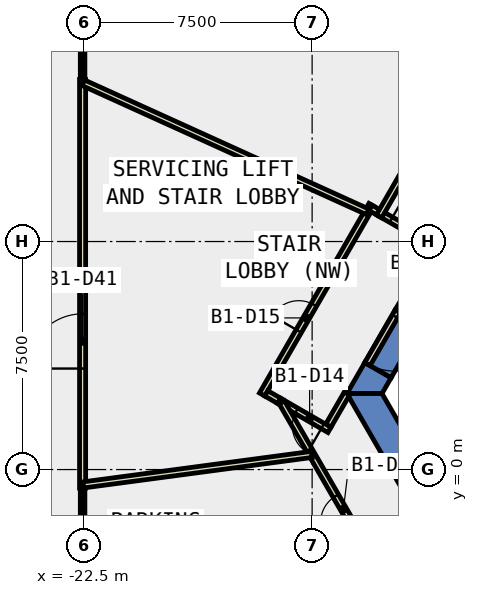
"""IFC4 building model, lengths in metres.
Left out: names, types, materials, properties, quantities, classifications, styles, units other than length and angle.
Written with IfcOpenShell. Run it as: python <this file> out.ifc"""

import sys

from ifc_helpers import new_model, si_unit, direction, frame, frame_2d, origin, place, context, subcontext, project, spatial, polyline, rectangle, outline, extrude, element, fill, save


model = new_model("IFC4")
c1 = context("Model", 3, precision=1e-05, world=origin(), true_north=direction((0.0, 1.0)))
c2 = subcontext(c1, "Body", "Model", "MODEL_VIEW")
j1 = project(units=[si_unit("LENGTHUNIT", "METRE"), si_unit("PLANEANGLEUNIT", "RADIAN")], contexts=[c1])
p1 = place(None, origin())
s1 = spatial("IfcSite", under=j1, at=p1, CompositionType="ELEMENT")
p2 = place(p1, origin())
s2 = spatial("IfcBuilding", under=s1, at=p2, CompositionType="ELEMENT")
p3 = place(p2, frame((0.0, 0.0, -5.5)))
s3 = spatial("IfcBuildingStorey", under=s2, at=p3, CompositionType="ELEMENT", Elevation=-5.5)
p4 = place(p3, frame((0.0, 0.0, -0.42)))
e1 = element("IfcWall", 1, at=p4, inside=s3, PredefinedType="SHEAR", context=c2, shape_type="SweptSolid", body=[
    extrude(outline(polyline([(-12.267, 5.252), (-11.402, 4.752), (-6.351, 13.5), (-6.928, 14.5), (-12.267, 5.252)])), origin(), (0.0, 0.0, 1.0), 5.42),
])
p5 = place(p3, frame((0.0, 0.0, -0.42)))
e2 = element("IfcWall", 2, at=p5, inside=s3, PredefinedType="SHEAR", context=c2, shape_type="SweptSolid", body=[
    extrude(outline(polyline([(-12.402, 3.02), (-13.267, 3.52), (-13.856, 2.5), (-12.702, 2.5), (-12.402, 3.02)])), origin(), (0.0, 0.0, 1.0), 5.42),
])
p6 = place(p3, frame((0.0, 0.0, 3.6)))
e3 = element("IfcWall", 3, at=p6, inside=s3, PredefinedType="SHEAR", context=c2, shape_type="SweptSolid", body=[
    extrude(outline(polyline([(-13.267, 3.52), (-12.402, 3.02), (-11.402, 4.752), (-12.267, 5.252), (-13.267, 3.52)])), origin(), (0.0, 0.0, 1.0), 1.4),
])
p7 = place(p3, frame((0.0, 0.0, -0.42)))
e4 = element("IfcWall", 4, at=p7, inside=s3, PredefinedType="SHEAR", context=c2, shape_type="SweptSolid", body=[
    extrude(outline(polyline([(-13.856, 2.5), (-6.928, -9.5), (-6.351, -8.5), (-12.702, 2.5), (-13.856, 2.5)])), origin(), (0.0, 0.0, 1.0), 5.42),
])
p8 = place(p3, frame((-22.55, -0.608, 0.0), z_axis=(0.0, 0.0, 1.0), x_axis=(0.0, 1.0, 0.0)))
e5 = element("IfcWall", 5, at=p8, inside=s3, PredefinedType="PARTITIONING", context=c2, shape_type="SweptSolid", body=[
    extrude(rectangle(XDim=13.439, YDim=0.2, at=frame_2d((6.719, 0.0))), origin(), (0.0, 0.0, 1.0), 4.9),
])
p9 = place(p8, frame((3.93, 0.0, 0.0)))
e6 = element("IfcOpeningElement", 6, at=p9, cuts=e5, PredefinedType="OPENING", context=c2, shape_type="SweptSolid", body=[
    extrude(rectangle(XDim=1.8, YDim=2.1, at=frame_2d((0.9, 1.05))), frame((0.0, 0.11, 0.0), z_axis=(0.0, -1.0, 0.0), x_axis=(1.0, 0.0, 0.0)), (0.0, 0.0, 1.0), 0.22),
])
p10 = place(p3, frame((-22.55, 12.831, 0.0), z_axis=(0.0, 0.0, 1.0), x_axis=(0.0, 1.0, 0.0)))
e7 = element("IfcWall", 7, at=p10, inside=s3, PredefinedType="PARTITIONING", context=c2, shape_type="SweptSolid", body=[
    extrude(rectangle(XDim=9.644, YDim=0.15, at=frame_2d((4.822, 0.0))), origin(), (0.0, 0.0, 1.0), 4.9),
])
p11 = place(p3, frame((-22.55, -5.126, 0.0), z_axis=(0.0, 0.0, 1.0), x_axis=(0.0, 1.0, 0.0)))
e8 = element("IfcWall", 8, at=p11, inside=s3, PredefinedType="PARTITIONING", context=c2, shape_type="SweptSolid", body=[
    extrude(rectangle(XDim=4.518, YDim=0.15, at=frame_2d((2.259, 0.0))), origin(), (0.0, 0.0, 1.0), 4.9),
])
p12 = place(p3, frame((-12.749, 8.417, 0.0), z_axis=(0.0, 0.0, 1.0), x_axis=(0.866010750942, -0.50002537861, 0.0)))
e9 = element("IfcWall", 9, at=p12, inside=s3, PredefinedType="PARTITIONING", context=c2, shape_type="SweptSolid", body=[
    extrude(rectangle(XDim=2.0, YDim=0.2, at=frame_2d((1.0, 0.0))), origin(), (0.0, 0.0, 1.0), 4.9),
])
p13 = place(p12, frame((0.4, 0.0, 0.0)))
e10 = element("IfcOpeningElement", 10, at=p13, cuts=e9, PredefinedType="OPENING", context=c2, shape_type="SweptSolid", body=[
    extrude(rectangle(XDim=1.0, YDim=2.1, at=frame_2d((0.5, 1.05))), frame((0.0, 0.11, 0.0), z_axis=(0.0, -1.0, 0.0), x_axis=(1.0, 0.0, 0.0)), (0.0, 0.0, 1.0), 0.22),
])
p14 = place(p3, frame((-13.856, 2.5, 0.0), z_axis=(0.0, 0.0, 1.0), x_axis=(-0.500114474492, -0.865959301817, 0.0)))
e11 = element("IfcWall", 11, at=p14, inside=s3, PredefinedType="PARTITIONING", context=c2, shape_type="SweptSolid", body=[
    extrude(rectangle(XDim=1.222, YDim=0.2, at=frame_2d((0.611, 0.0))), origin(), (0.0, 0.0, 1.0), 4.9),
])
p15 = place(p3, frame((-14.43, 1.305, 0.0), z_axis=(0.0, 0.0, 1.0), x_axis=(-0.866000389056, 0.500043324278, 0.0)))
e12 = element("IfcWall", 12, at=p15, inside=s3, PredefinedType="PARTITIONING", context=c2, shape_type="SweptSolid", body=[
    extrude(rectangle(XDim=1.91, YDim=0.2, at=frame_2d((0.955, 0.0))), origin(), (0.0, 0.0, 1.0), 4.9),
])
p16 = place(p15, frame((0.254, 0.0, 0.0)))
e13 = element("IfcOpeningElement", 13, at=p16, cuts=e12, PredefinedType="OPENING", context=c2, shape_type="SweptSolid", body=[
    extrude(rectangle(XDim=1.0, YDim=2.1, at=frame_2d((0.5, 1.05))), frame((0.0, 0.11, 0.0), z_axis=(0.0, -1.0, 0.0), x_axis=(1.0, 0.0, 0.0)), (0.0, 0.0, 1.0), 0.22),
])
p17 = place(p3, frame((-16.645, 2.468, 0.0), z_axis=(0.0, 0.0, 1.0), x_axis=(0.499968011863, 0.866043871356, 0.0)))
e14 = element("IfcWall", 14, at=p17, inside=s3, PredefinedType="PARTITIONING", context=c2, shape_type="SweptSolid", body=[
    extrude(rectangle(XDim=7.201, YDim=0.2, at=frame_2d((3.6, 0.0))), origin(), (0.0, 0.0, 1.0), 4.9),
])
p18 = place(p17, frame((2.409, 0.0, 0.0)))
e15 = element("IfcOpeningElement", 15, at=p18, cuts=e14, PredefinedType="OPENING", context=c2, shape_type="SweptSolid", body=[
    extrude(rectangle(XDim=1.0, YDim=2.1, at=frame_2d((0.5, 1.05))), frame((0.0, 0.11, 0.0), z_axis=(0.0, -1.0, 0.0), x_axis=(1.0, 0.0, 0.0)), (0.0, 0.0, 1.0), 0.22),
])
p19 = place(p3, frame((-16.508, 2.505, 0.0), z_axis=(0.0, 0.0, 1.0), x_axis=(0.865494662716, -0.500918145819, 0.0)))
e16 = element("IfcWall", 16, at=p19, inside=s3, PredefinedType="PARTITIONING", context=c2, shape_type="SweptSolid", body=[
    extrude(rectangle(XDim=0.489, YDim=0.2, at=frame_2d((0.244, 0.0))), origin(), (0.0, 0.0, 1.0), 4.9),
])
p20 = place(p3, frame((-13.082, 8.609, 0.0), z_axis=(0.0, 0.0, 1.0), x_axis=(0.865998573537, -0.500046468473, 0.0)))
e17 = element("IfcWall", 17, at=p20, inside=s3, PredefinedType="PARTITIONING", context=c2, shape_type="SweptSolid", body=[
    extrude(rectangle(XDim=0.37, YDim=0.2, at=frame_2d((0.185, 0.0))), origin(), (0.0, 0.0, 1.0), 4.9),
])
p21 = place(p3, frame((-12.799, 8.33, 0.0), z_axis=(0.0, 0.0, 1.0), x_axis=(0.499923440311, 0.86606960103, 0.0)))
e18 = element("IfcWall", 18, at=p21, inside=s3, PredefinedType="PARTITIONING", context=c2, shape_type="SweptSolid", body=[
    extrude(rectangle(XDim=9.534, YDim=0.2, at=frame_2d((4.767, 0.0))), origin(), (0.0, 0.0, 1.0), 4.9),
])
p22 = place(p21, frame((5.986, 0.0, 0.0)))
e19 = element("IfcOpeningElement", 19, at=p22, cuts=e18, PredefinedType="OPENING", context=c2, shape_type="SweptSolid", body=[
    extrude(rectangle(XDim=1.0, YDim=2.1, at=frame_2d((0.5, 1.05))), frame((0.0, 0.11, 0.0), z_axis=(0.0, -1.0, 0.0), x_axis=(1.0, 0.0, 0.0)), (0.0, 0.0, 1.0), 0.22),
])
p23 = place(p3, frame((-13.485, -2.142, 0.0), z_axis=(0.0, 0.0, 1.0), x_axis=(-0.500042049778, 0.866001124973, 0.0)))
e20 = element("IfcWall", 20, at=p23, inside=s3, PredefinedType="PARTITIONING", context=c2, shape_type="SweptSolid", body=[
    extrude(rectangle(XDim=5.025, YDim=0.2, at=frame_2d((2.513, 0.0))), origin(), (0.0, 0.0, 1.0), 4.9),
])
p24 = place(p23, frame((0.47, 0.0, 0.0)))
e21 = element("IfcOpeningElement", 21, at=p24, cuts=e20, PredefinedType="OPENING", context=c2, shape_type="SweptSolid", body=[
    extrude(rectangle(XDim=1.0, YDim=2.1, at=frame_2d((0.5, 1.05))), frame((0.0, 0.11, 0.0), z_axis=(0.0, -1.0, 0.0), x_axis=(1.0, 0.0, 0.0)), (0.0, 0.0, 1.0), 0.22),
])
p25 = place(p3, frame((-22.527, 12.721, 0.0), z_axis=(0.0, 0.0, 1.0), x_axis=(0.910643923171, -0.413192019758, 0.0)))
e22 = element("IfcWall", 22, at=p25, inside=s3, PredefinedType="PARTITIONING", context=c2, shape_type="SweptSolid", body=[
    extrude(rectangle(XDim=10.269, YDim=0.2, at=frame_2d((5.134, 0.0))), origin(), (0.0, 0.0, 1.0), 4.9),
])
p26 = place(p3, frame((-15.01, 0.498, 0.0), z_axis=(0.0, 0.0, 1.0), x_axis=(-0.991211581173, -0.132286058785, 0.0)))
e23 = element("IfcWall", 23, at=p26, inside=s3, PredefinedType="PARTITIONING", context=c2, shape_type="SweptSolid", body=[
    extrude(rectangle(XDim=7.582, YDim=0.2, at=frame_2d((3.791, 0.0))), origin(), (0.0, 0.0, 1.0), 4.9),
])
p27 = place(p3, frame((-12.18, 5.202, 0.0), z_axis=(0.0, 0.0, 1.0), x_axis=(-0.50002537861, -0.866010750942, 0.0)))
e24 = element("IfcWall", 24, at=p27, inside=s3, PredefinedType="PARTITIONING", context=c2, shape_type="SweptSolid", body=[
    extrude(rectangle(XDim=2.0, YDim=0.2, at=frame_2d((1.0, 0.0))), origin(), (0.0, 0.0, 1.0), 2.4),
])
p28 = place(p27, frame((0.19, 0.0, 0.0)))
e25 = element("IfcOpeningElement", 25, at=p28, cuts=e24, PredefinedType="OPENING", context=c2, shape_type="SweptSolid", body=[
    extrude(rectangle(XDim=1.8, YDim=2.1, at=frame_2d((0.9, 1.05))), frame((0.0, 0.11, 0.0), z_axis=(0.0, -1.0, 0.0), x_axis=(1.0, 0.0, 0.0)), (0.0, 0.0, 1.0), 0.22),
])
p29 = place(p13, origin())
e26 = element("IfcDoor", 26, at=p29, inside=s3, OperationType="SINGLE_SWING_LEFT", PredefinedType="DOOR", context=c2, shape_type="SweptSolid", body=[
    extrude(rectangle(XDim=1.0, YDim=2.1, at=frame_2d((0.5, 1.05))), frame((0.0, 0.025, 0.0), z_axis=(0.0, -1.0, 0.0), x_axis=(1.0, 0.0, 0.0)), (0.0, 0.0, 1.0), 0.05),
])
fill(e10, e26)
p30 = place(p16, origin())
e27 = element("IfcDoor", 27, at=p30, inside=s3, OperationType="SINGLE_SWING_RIGHT", PredefinedType="DOOR", context=c2, shape_type="SweptSolid", body=[
    extrude(rectangle(XDim=1.0, YDim=2.1, at=frame_2d((0.5, 1.05))), frame((0.0, 0.025, 0.0), z_axis=(0.0, -1.0, 0.0), x_axis=(1.0, 0.0, 0.0)), (0.0, 0.0, 1.0), 0.05),
])
fill(e13, e27)
p31 = place(p18, origin())
e28 = element("IfcDoor", 28, at=p31, inside=s3, OperationType="SINGLE_SWING_LEFT", PredefinedType="DOOR", context=c2, shape_type="SweptSolid", body=[
    extrude(rectangle(XDim=1.0, YDim=2.1, at=frame_2d((0.5, 1.05))), frame((0.0, 0.025, 0.0), z_axis=(0.0, -1.0, 0.0), x_axis=(1.0, 0.0, 0.0)), (0.0, 0.0, 1.0), 0.05),
])
fill(e15, e28)
p32 = place(p24, origin())
e29 = element("IfcDoor", 29, at=p32, inside=s3, OperationType="SINGLE_SWING_LEFT", PredefinedType="DOOR", context=c2, shape_type="SweptSolid", body=[
    extrude(rectangle(XDim=1.0, YDim=2.1, at=frame_2d((0.5, 1.05))), frame((0.0, 0.025, 0.0), z_axis=(0.0, -1.0, 0.0), x_axis=(1.0, 0.0, 0.0)), (0.0, 0.0, 1.0), 0.05),
])
fill(e21, e29)
p33 = place(p9, origin())
e30 = element("IfcDoor", 30, at=p33, inside=s3, OperationType="DOUBLE_DOOR_SINGLE_SWING", PredefinedType="DOOR", context=c2, shape_type="SweptSolid", body=[
    extrude(rectangle(XDim=1.8, YDim=2.1, at=frame_2d((0.9, 1.05))), frame((0.0, 0.025, 0.0), z_axis=(0.0, -1.0, 0.0), x_axis=(1.0, 0.0, 0.0)), (0.0, 0.0, 1.0), 0.05),
])
fill(e6, e30)
p34 = place(p28, origin())
e31 = element("IfcDoor", 31, at=p34, inside=s3, OperationType="DOUBLE_DOOR_SINGLE_SWING", PredefinedType="DOOR", context=c2, shape_type="SweptSolid", body=[
    extrude(rectangle(XDim=1.8, YDim=2.1, at=frame_2d((0.9, 1.05))), frame((0.0, 0.025, 0.0), z_axis=(0.0, -1.0, 0.0), x_axis=(1.0, 0.0, 0.0)), (0.0, 0.0, 1.0), 0.05),
])
fill(e25, e31)
save(model, sys.argv[1])
